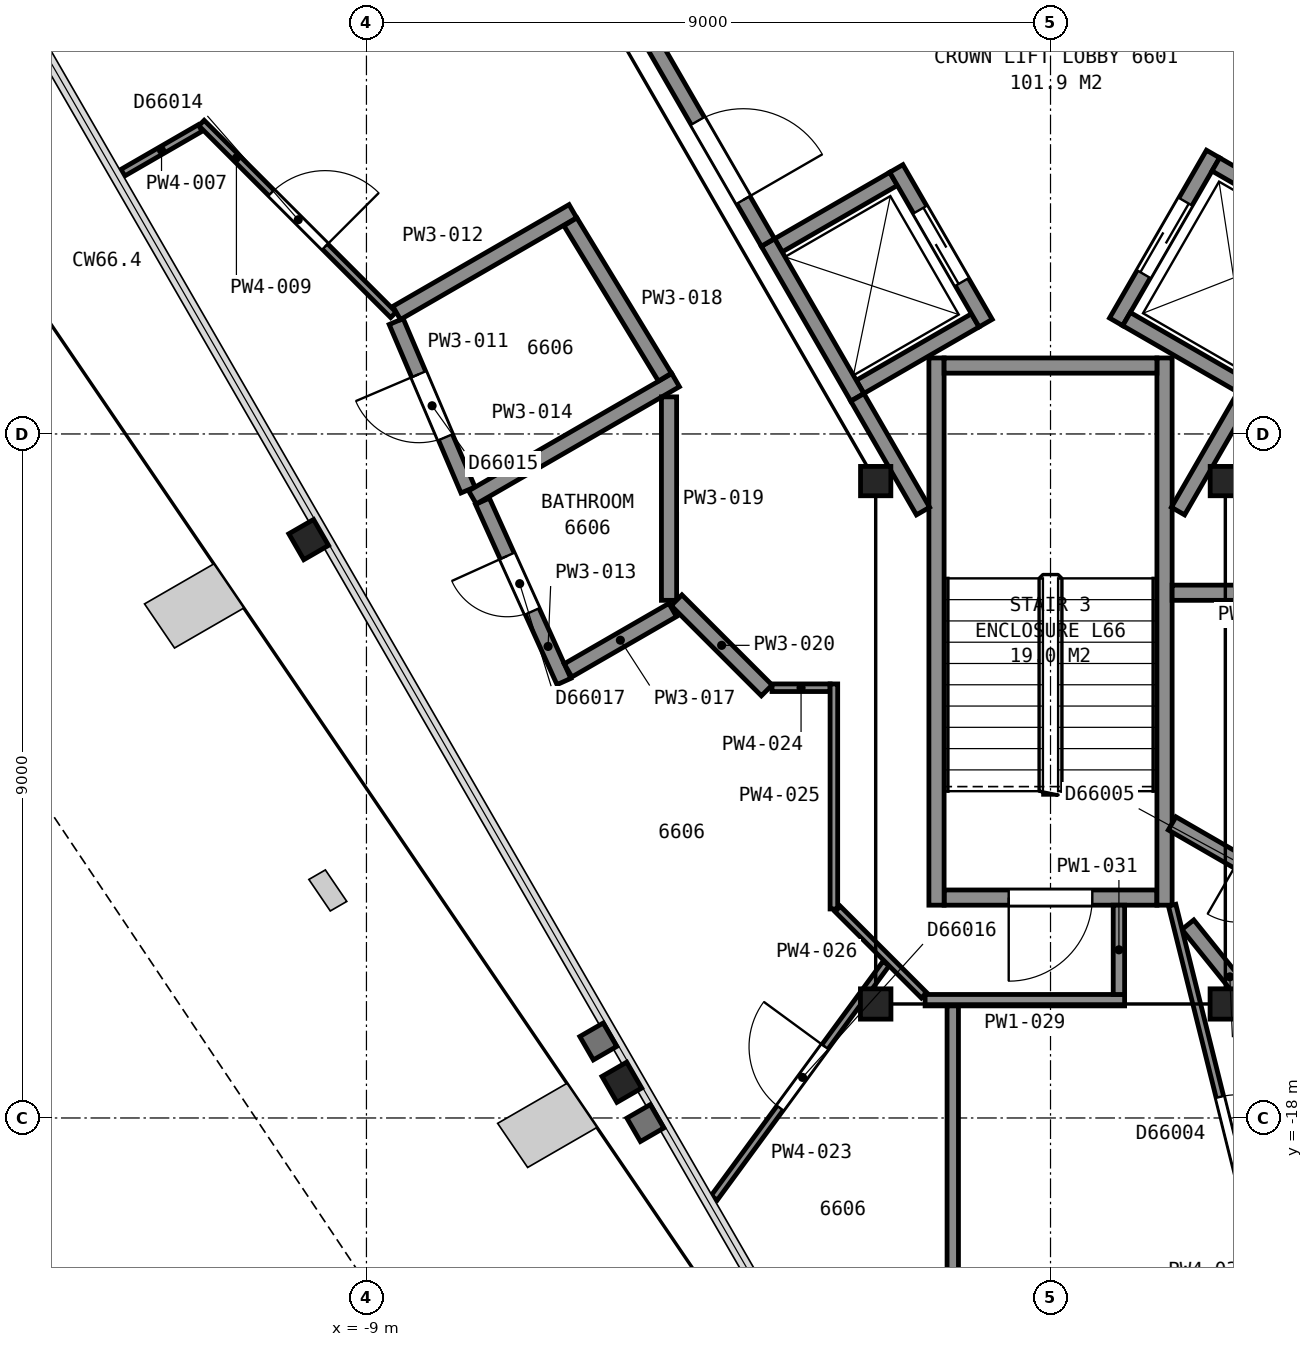
"""IFC4 building model, lengths in metres.
Left out: names, types, materials, properties, quantities, classifications, styles, units other than length and angle.
Written with IfcOpenShell. Run it as: python <this file> out.ifc"""

import sys

from ifc_helpers import new_model, si_unit, direction, frame, frame_2d, origin, origin_2d, place, context, subcontext, project, spatial, rectangle, i_section, extrude, element, fill, save


model = new_model("IFC4")
c1 = context("Model", 3, precision=1e-05, world=origin(), true_north=direction((0.0, 1.0)))
c2 = subcontext(c1, "Body", "Model", "MODEL_VIEW")
j1 = project(units=[si_unit("LENGTHUNIT", "METRE"), si_unit("PLANEANGLEUNIT", "RADIAN")], contexts=[c1])
p1 = place(None, origin())
s1 = spatial("IfcSite", under=j1, at=p1, CompositionType="ELEMENT")
p2 = place(p1, origin())
s2 = spatial("IfcBuilding", under=s1, at=p2, CompositionType="ELEMENT")
p3 = place(p2, frame((0.0, 0.0, 264.0)))
s3 = spatial("IfcBuildingStorey", under=s2, at=p3, CompositionType="ELEMENT", Elevation=264.0)
for number, where, z_axis, x_axis in (
    (1, (-9.76, -10.39, 0.0), (0.0, 0.0, 1.0), (-0.5, 0.866, 0.0)),
    (2, (-5.64, -17.53, 0.0), (0.0, 0.0, 1.0), (-0.5, 0.866, 0.0)),
):
    element("IfcColumn", number, at=place(p3, frame(where, z_axis=z_axis, x_axis=x_axis)), inside=s3, PredefinedType="COLUMN", context=c2, shape_type="SweptSolid", body=[
        extrude(i_section(OverallWidth=0.394, OverallDepth=0.376, WebThickness=0.017, FlangeThickness=0.028, FilletRadius=0.015, at=origin_2d()), origin(), (0.0, 0.0, 1.0), 3.7),
    ])
p4 = place(p3, frame((-2.3, -9.62, 0.05), z_axis=(0.0, 0.0, 1.0), x_axis=(1.0, 0.0, 0.0)))
e3 = element("IfcColumn", 3, at=p4, inside=s3, PredefinedType="COLUMN", context=c2, shape_type="SweptSolid", body=[
    extrude(i_section(OverallWidth=0.399, OverallDepth=0.386, WebThickness=0.021, FlangeThickness=0.033, FilletRadius=0.015, at=origin_2d()), origin(), (0.0, 0.0, 1.0), 3.65),
])
for number, where, z_axis, x_axis in (
    (4, (-2.3, -16.5, 0.05), (0.0, 0.0, 1.0), (-1.0, 0.0, 0.0)),
    (5, (2.3, -16.5, 0.05), (0.0, 0.0, 1.0), (-1.0, 0.0, 0.0)),
):
    element("IfcColumn", number, at=place(p3, frame(where, z_axis=z_axis, x_axis=x_axis)), inside=s3, PredefinedType="COLUMN", context=c2, shape_type="SweptSolid", body=[
        extrude(i_section(OverallWidth=0.401, OverallDepth=0.399, WebThickness=0.025, FlangeThickness=0.04, FilletRadius=0.015, at=origin_2d()), origin(), (0.0, 0.0, 1.0), 3.65),
    ])
p5 = place(p3, frame((2.3, -9.62, 0.05), z_axis=(0.0, 0.0, 1.0), x_axis=(1.0, 0.0, 0.0)))
e6 = element("IfcColumn", 6, at=p5, inside=s3, PredefinedType="COLUMN", context=c2, shape_type="SweptSolid", body=[
    extrude(i_section(OverallWidth=0.399, OverallDepth=0.386, WebThickness=0.021, FlangeThickness=0.033, FilletRadius=0.015, at=origin_2d()), origin(), (0.0, 0.0, 1.0), 3.65),
])
p6 = place(p3, frame((-1.4, -15.1, 0.0), z_axis=(0.0, 0.0, 1.0), x_axis=(1.0, 0.0, 0.0)))
e7 = element("IfcWall", 7, at=p6, inside=s3, PredefinedType="PARTITIONING", context=c2, shape_type="SweptSolid", body=[
    extrude(rectangle(XDim=2.8, YDim=0.2, at=frame_2d((1.4, 0.0))), origin(), (0.0, 0.0, 1.0), 3.45),
])
p7 = place(p6, frame((0.85, 0.0, 0.0)))
e8 = element("IfcOpeningElement", 8, at=p7, cuts=e7, PredefinedType="OPENING", context=c2, shape_type="SweptSolid", body=[
    extrude(rectangle(XDim=1.1, YDim=2.1, at=frame_2d((0.55, 1.05))), frame((0.0, 0.11, 0.0), z_axis=(0.0, -1.0, 0.0), x_axis=(1.0, 0.0, 0.0)), (0.0, 0.0, 1.0), 0.22),
])
for number, where, z_axis, x_axis in (
    (9, (1.5, -8.0, 0.0), (0.0, 0.0, 1.0), (0.0, -1.0, 0.0)),
    (10, (-1.5, -8.0, 0.0), (0.0, 0.0, 1.0), (0.0, -1.0, 0.0)),
):
    element("IfcWall", number, at=place(p3, frame(where, z_axis=z_axis, x_axis=x_axis)), inside=s3, PredefinedType="PARTITIONING", context=c2, shape_type="SweptSolid", body=[
        extrude(rectangle(XDim=7.2, YDim=0.2, at=frame_2d((3.6, 0.0))), origin(), (0.0, 0.0, 1.0), 3.45),
    ])
p8 = place(p3, frame((-1.4, -8.1, 0.0), z_axis=(0.0, 0.0, 1.0), x_axis=(1.0, 0.0, 0.0)))
e11 = element("IfcWall", 11, at=p8, inside=s3, PredefinedType="PARTITIONING", context=c2, shape_type="SweptSolid", body=[
    extrude(rectangle(XDim=2.8, YDim=0.2, at=frame_2d((1.4, 0.0))), origin(), (0.0, 0.0, 1.0), 3.45),
])
for number, where, z_axis, x_axis in (
    (12, (-2.505, -8.38, 0.0), (0.0, 0.0, 1.0), (0.866, 0.5, 0.0)),
    (13, (-3.58, -6.519, 0.0), (0.0, 0.0, 1.0), (0.866, 0.5, 0.0)),
):
    element("IfcWall", number, at=place(p3, frame(where, z_axis=z_axis, x_axis=x_axis)), inside=s3, PredefinedType="PARTITIONING", context=c2, shape_type="SweptSolid", body=[
        extrude(rectangle(XDim=1.75, YDim=0.2, at=frame_2d((0.875, 0.0))), origin(), (0.0, 0.0, 1.0), 3.7),
    ])
p9 = place(p3, frame((0.863, -7.525, 0.0), z_axis=(0.0, 0.0, 1.0), x_axis=(0.499990435942, 0.866030925526, 0.0)))
e14 = element("IfcWall", 14, at=p9, inside=s3, PredefinedType="PARTITIONING", context=c2, shape_type="SweptSolid", body=[
    extrude(rectangle(XDim=2.55, YDim=0.2, at=frame_2d((1.275, 0.0))), origin(), (0.0, 0.0, 1.0), 3.7),
])
p10 = place(p9, frame((0.725, 0.0, 0.0)))
e15 = element("IfcOpeningElement", 15, at=p10, cuts=e14, PredefinedType="OPENING", context=c2, shape_type="SweptSolid", body=[
    extrude(rectangle(XDim=1.1, YDim=2.1, at=frame_2d((0.55, 1.05))), frame((0.0, 0.11, 0.0), z_axis=(0.0, -1.0, 0.0), x_axis=(1.0, 0.0, 0.0)), (0.0, 0.0, 1.0), 0.22),
])
p11 = place(p3, frame((-0.853, -7.542, 0.0), z_axis=(0.0, 0.0, 1.0), x_axis=(-0.500016218704, 0.866016039709, 0.0)))
e16 = element("IfcWall", 16, at=p11, inside=s3, PredefinedType="PARTITIONING", context=c2, shape_type="SweptSolid", body=[
    extrude(rectangle(XDim=2.35, YDim=0.2, at=frame_2d((1.175, 0.0))), origin(), (0.0, 0.0, 1.0), 3.7),
])
p12 = place(p11, frame((0.625, 0.0, 0.0)))
e17 = element("IfcOpeningElement", 17, at=p12, cuts=e16, PredefinedType="OPENING", context=c2, shape_type="SweptSolid", body=[
    extrude(rectangle(XDim=1.1, YDim=2.1, at=frame_2d((0.55, 1.05))), frame((0.0, 0.11, 0.0), z_axis=(0.0, -1.0, 0.0), x_axis=(1.0, 0.0, 0.0)), (0.0, 0.0, 1.0), 0.22),
])
p13 = place(p3, frame((-2.542, -8.517, 0.0), z_axis=(0.0, 0.0, 1.0), x_axis=(-0.500016218704, 0.866016039709, 0.0)))
e18 = element("IfcWall", 18, at=p13, inside=s3, PredefinedType="PARTITIONING", context=c2, shape_type="SweptSolid", body=[
    extrude(rectangle(XDim=2.35, YDim=0.2, at=frame_2d((1.175, 0.0))), origin(), (0.0, 0.0, 1.0), 3.7),
])
for number, where, z_axis, x_axis in (
    (19, (3.69, -6.328, 0.0), (0.0, 0.0, 1.0), (-0.866, 0.5, 0.0)),
    (20, (2.515, -8.363, 0.0), (0.0, 0.0, 1.0), (-0.866, 0.5, 0.0)),
):
    element("IfcWall", number, at=place(p3, frame(where, z_axis=z_axis, x_axis=x_axis)), inside=s3, PredefinedType="PARTITIONING", context=c2, shape_type="SweptSolid", body=[
        extrude(rectangle(XDim=1.75, YDim=0.2, at=frame_2d((0.875, 0.0))), origin(), (0.0, 0.0, 1.0), 3.7),
    ])
p14 = place(p3, frame((-7.141, -0.551, 0.0), z_axis=(0.0, 0.0, 1.0), x_axis=(0.500001302854, -0.86602465158, 0.0)))
e21 = element("IfcWall", 21, at=p14, inside=s3, PredefinedType="PARTITIONING", context=c2, shape_type="SweptSolid", body=[
    extrude(rectangle(XDim=6.846, YDim=0.2, at=frame_2d((3.423, 0.0))), origin(), (0.0, 0.0, 1.0), 3.45),
])
p15 = place(p14, frame((5.0, 0.0, 0.0)))
e22 = element("IfcOpeningElement", 22, at=p15, cuts=e21, PredefinedType="OPENING", context=c2, shape_type="SweptSolid", body=[
    extrude(rectangle(XDim=1.2, YDim=2.1, at=frame_2d((0.6, 1.05))), frame((0.0, 0.11, 0.0), z_axis=(0.0, -1.0, 0.0), x_axis=(1.0, 0.0, 0.0)), (0.0, 0.0, 1.0), 0.22),
])
p16 = place(p3, frame((-2.541, -8.519, 0.0), z_axis=(0.0, 0.0, 1.0), x_axis=(0.500016142392, -0.86601608377, 0.0)))
e23 = element("IfcWall", 23, at=p16, inside=s3, PredefinedType="PARTITIONING", context=c2, shape_type="SweptSolid", body=[
    extrude(rectangle(XDim=1.727, YDim=0.2, at=frame_2d((0.864, 0.0))), origin(), (0.0, 0.0, 1.0), 3.45),
])
p17 = place(p3, frame((1.677, -10.015, 0.0), z_axis=(0.0, 0.0, 1.0), x_axis=(0.49983532306, 0.866120459187, 0.0)))
e24 = element("IfcWall", 24, at=p17, inside=s3, PredefinedType="PARTITIONING", context=c2, shape_type="SweptSolid", body=[
    extrude(rectangle(XDim=1.748, YDim=0.2, at=frame_2d((0.874, 0.0))), origin(), (0.0, 0.0, 1.0), 3.45),
])
p18 = place(p3, frame((-12.205, -5.562, 0.0), z_axis=(0.0, 0.0, 1.0), x_axis=(0.865895054285, 0.500225704022, 0.0)))
e25 = element("IfcWall", 25, at=p18, inside=s3, PredefinedType="PARTITIONING", context=c2, shape_type="SweptSolid", body=[
    extrude(rectangle(XDim=1.176, YDim=0.1, at=frame_2d((0.588, 0.0))), origin(), (0.0, 0.0, 1.0), 2.723),
])
p19 = place(p3, frame((-8.646, -7.433, 0.0), z_axis=(0.0, 0.0, 1.0), x_axis=(-0.707106781187, 0.707106781187, 0.0)))
e26 = element("IfcWall", 26, at=p19, inside=s3, PredefinedType="PARTITIONING", context=c2, shape_type="SweptSolid", body=[
    extrude(rectangle(XDim=3.57, YDim=0.1, at=frame_2d((1.785, 0.0))), origin(), (0.0, 0.0, 1.0), 2.723),
])
p20 = place(p19, frame((1.27, 0.0, 0.0)))
e27 = element("IfcOpeningElement", 27, at=p20, cuts=e26, PredefinedType="OPENING", context=c2, shape_type="SweptSolid", body=[
    extrude(rectangle(XDim=1.0, YDim=2.1, at=frame_2d((0.5, 1.05))), frame((0.0, 0.06, 0.0), z_axis=(0.0, -1.0, 0.0), x_axis=(1.0, 0.0, 0.0)), (0.0, 0.0, 1.0), 0.12),
])
p21 = place(p3, frame((-8.609, -7.521, 0.0), z_axis=(0.0, 0.0, 1.0), x_axis=(0.391998641344, -0.91996579566, 0.0)))
e28 = element("IfcWall", 28, at=p21, inside=s3, PredefinedType="PARTITIONING", context=c2, shape_type="SweptSolid", body=[
    extrude(rectangle(XDim=2.41, YDim=0.2, at=frame_2d((1.205, 0.0))), origin(), (0.0, 0.0, 1.0), 2.723),
])
p22 = place(p21, frame((0.755, 0.0, 0.0)))
e29 = element("IfcOpeningElement", 29, at=p22, cuts=e28, PredefinedType="OPENING", context=c2, shape_type="SweptSolid", body=[
    extrude(rectangle(XDim=0.9, YDim=2.1, at=frame_2d((0.45, 1.05))), frame((0.0, 0.11, 0.0), z_axis=(0.0, -1.0, 0.0), x_axis=(1.0, 0.0, 0.0)), (0.0, 0.0, 1.0), 0.22),
])
p23 = place(p3, frame((-8.603, -7.408, 0.0), z_axis=(0.0, 0.0, 1.0), x_axis=(0.865966883336, 0.500101346695, 0.0)))
e30 = element("IfcWall", 30, at=p23, inside=s3, PredefinedType="PARTITIONING", context=c2, shape_type="SweptSolid", body=[
    extrude(rectangle(XDim=2.677, YDim=0.2, at=frame_2d((1.339, 0.0))), origin(), (0.0, 0.0, 1.0), 2.723),
])
p24 = place(p3, frame((-7.474, -9.885, 0.0), z_axis=(0.0, 0.0, 1.0), x_axis=(0.411787773138, -0.911279775862, 0.0)))
e31 = element("IfcWall", 31, at=p24, inside=s3, PredefinedType="PARTITIONING", context=c2, shape_type="SweptSolid", body=[
    extrude(rectangle(XDim=2.603, YDim=0.2, at=frame_2d((1.301, 0.0))), origin(), (0.0, 0.0, 1.0), 2.723),
])
p25 = place(p24, frame((0.79, 0.0, 0.0)))
e32 = element("IfcOpeningElement", 32, at=p25, cuts=e31, PredefinedType="OPENING", context=c2, shape_type="SweptSolid", body=[
    extrude(rectangle(XDim=0.8, YDim=2.1, at=frame_2d((0.4, 1.05))), frame((0.0, 0.11, 0.0), z_axis=(0.0, -1.0, 0.0), x_axis=(1.0, 0.0, 0.0)), (0.0, 0.0, 1.0), 0.22),
])
p26 = place(p3, frame((-7.606, -9.835, 0.0), z_axis=(0.0, 0.0, 1.0), x_axis=(0.866093395895, 0.499882215713, 0.0)))
e33 = element("IfcWall", 33, at=p26, inside=s3, PredefinedType="PARTITIONING", context=c2, shape_type="SweptSolid", body=[
    extrude(rectangle(XDim=3.087, YDim=0.2, at=frame_2d((1.543, 0.0))), origin(), (0.0, 0.0, 1.0), 2.723),
])
p27 = place(p3, frame((-6.348, -12.111, 0.0), z_axis=(0.0, 0.0, 1.0), x_axis=(0.866004001318, 0.500037068326, 0.0)))
e34 = element("IfcWall", 34, at=p27, inside=s3, PredefinedType="PARTITIONING", context=c2, shape_type="SweptSolid", body=[
    extrude(rectangle(XDim=1.59, YDim=0.2, at=frame_2d((0.795, 0.0))), origin(), (0.0, 0.0, 1.0), 2.723),
])
p28 = place(p3, frame((-6.316, -6.209, 0.0), z_axis=(0.0, 0.0, 1.0), x_axis=(0.519665190876, -0.854369995606, 0.0)))
e35 = element("IfcWall", 35, at=p28, inside=s3, PredefinedType="PARTITIONING", context=c2, shape_type="SweptSolid", body=[
    extrude(rectangle(XDim=2.392, YDim=0.2, at=frame_2d((1.196, 0.0))), origin(), (0.0, 0.0, 1.0), 2.723),
])
p29 = place(p3, frame((-5.019, -11.189, 0.0), z_axis=(0.0, 0.0, 1.0), x_axis=(0.0, 1.0, 0.0)))
e36 = element("IfcWall", 36, at=p29, inside=s3, PredefinedType="PARTITIONING", context=c2, shape_type="SweptSolid", body=[
    extrude(rectangle(XDim=2.677, YDim=0.2, at=frame_2d((1.338, 0.0))), origin(), (0.0, 0.0, 1.0), 2.723),
])
p30 = place(p3, frame((-4.92, -11.188, 0.0), z_axis=(0.0, 0.0, 1.0), x_axis=(0.707106781187, -0.707106781187, 0.0)))
e37 = element("IfcWall", 37, at=p30, inside=s3, PredefinedType="PARTITIONING", context=c2, shape_type="SweptSolid", body=[
    extrude(rectangle(XDim=1.678, YDim=0.2, at=frame_2d((0.839, 0.0))), origin(), (0.0, 0.0, 1.0), 2.723),
])
p31 = place(p3, frame((-2.164, -15.968, 0.0), z_axis=(0.0, 0.0, 1.0), x_axis=(-0.591435630084, -0.806352215516, 0.0)))
e38 = element("IfcWall", 38, at=p31, inside=s3, PredefinedType="PARTITIONING", context=c2, shape_type="SweptSolid", body=[
    extrude(rectangle(XDim=3.824, YDim=0.1, at=frame_2d((1.912, 0.0))), origin(), (0.0, 0.0, 1.0), 2.723),
])
p32 = place(p31, frame((1.358, 0.0, 0.0)))
e39 = element("IfcOpeningElement", 39, at=p32, cuts=e38, PredefinedType="OPENING", context=c2, shape_type="SweptSolid", body=[
    extrude(rectangle(XDim=1.0, YDim=2.1, at=frame_2d((0.5, 1.05))), frame((0.0, 0.06, 0.0), z_axis=(0.0, -1.0, 0.0), x_axis=(1.0, 0.0, 0.0)), (0.0, 0.0, 1.0), 0.12),
])
p33 = place(p3, frame((-3.664, -12.339, 0.0), z_axis=(0.0, 0.0, 1.0), x_axis=(1.0, 0.0, 0.0)))
e40 = element("IfcWall", 40, at=p33, inside=s3, PredefinedType="PARTITIONING", context=c2, shape_type="SweptSolid", body=[
    extrude(rectangle(XDim=0.764, YDim=0.1, at=frame_2d((0.382, 0.0))), origin(), (0.0, 0.0, 1.0), 2.723),
])
p34 = place(p3, frame((-2.85, -15.25, 0.0), z_axis=(0.0, 0.0, 1.0), x_axis=(0.0, 1.0, 0.0)))
e41 = element("IfcWall", 41, at=p34, inside=s3, PredefinedType="PARTITIONING", context=c2, shape_type="SweptSolid", body=[
    extrude(rectangle(XDim=2.961, YDim=0.1, at=frame_2d((1.48, 0.0))), origin(), (0.0, 0.0, 1.0), 2.723),
])
p35 = place(p3, frame((-2.801, -15.25, 0.0), z_axis=(0.0, 0.0, 1.0), x_axis=(0.707106781187, -0.707106781187, 0.0)))
e42 = element("IfcWall", 42, at=p35, inside=s3, PredefinedType="PARTITIONING", context=c2, shape_type="SweptSolid", body=[
    extrude(rectangle(XDim=1.608, YDim=0.1, at=frame_2d((0.804, 0.0))), origin(), (0.0, 0.0, 1.0), 2.723),
])
p36 = place(p3, frame((-1.65, -16.45, 0.0), z_axis=(0.0, 0.0, 1.0), x_axis=(1.0, 0.0, 0.0)))
e43 = element("IfcWall", 43, at=p36, inside=s3, PredefinedType="PARTITIONING", context=c2, shape_type="SweptSolid", body=[
    extrude(rectangle(XDim=2.625, YDim=0.15, at=frame_2d((1.312, 0.0))), origin(), (0.0, 0.0, 1.0), 2.723),
])
p37 = place(p3, frame((-1.286, -24.421, 0.0), z_axis=(0.0, 0.0, 1.0), x_axis=(0.0, 1.0, 0.0)))
e44 = element("IfcWall", 44, at=p37, inside=s3, PredefinedType="PARTITIONING", context=c2, shape_type="SweptSolid", body=[
    extrude(rectangle(XDim=7.896, YDim=0.15, at=frame_2d((3.948, 0.0))), origin(), (0.0, 0.0, 1.0), 2.723),
])
p38 = place(p3, frame((0.9, -16.375, 0.0), z_axis=(0.0, 0.0, 1.0), x_axis=(0.0, 1.0, 0.0)))
e45 = element("IfcWall", 45, at=p38, inside=s3, PredefinedType="PARTITIONING", context=c2, shape_type="SweptSolid", body=[
    extrude(rectangle(XDim=1.175, YDim=0.15, at=frame_2d((0.587, 0.0))), origin(), (0.0, 0.0, 1.0), 2.723),
])
p39 = place(p3, frame((1.807, -15.457, 0.0), z_axis=(0.0, 0.0, 1.0), x_axis=(0.62721044395, -0.778849830841, 0.0)))
e46 = element("IfcWall", 46, at=p39, inside=s3, PredefinedType="PARTITIONING", context=c2, shape_type="SweptSolid", body=[
    extrude(rectangle(XDim=1.761, YDim=0.2, at=frame_2d((0.881, 0.0))), origin(), (0.0, 0.0, 1.0), 2.723),
])
p40 = place(p3, frame((3.127, -21.335, 0.0), z_axis=(0.0, 0.0, 1.0), x_axis=(-0.241554155251, 0.970387340231, 0.0)))
e47 = element("IfcWall", 47, at=p40, inside=s3, PredefinedType="PARTITIONING", context=c2, shape_type="SweptSolid", body=[
    extrude(rectangle(XDim=6.322, YDim=0.1, at=frame_2d((3.161, 0.0))), origin(), (0.0, 0.0, 1.0), 2.723),
])
p41 = place(p40, frame((2.722, 0.0, 0.0)))
e48 = element("IfcOpeningElement", 48, at=p41, cuts=e47, PredefinedType="OPENING", context=c2, shape_type="SweptSolid", body=[
    extrude(rectangle(XDim=1.0, YDim=2.1, at=frame_2d((0.5, 1.05))), frame((0.0, 0.06, 0.0), z_axis=(0.0, -1.0, 0.0), x_axis=(1.0, 0.0, 0.0)), (0.0, 0.0, 1.0), 0.12),
])
p42 = place(p3, frame((4.144, -15.593, 0.0), z_axis=(0.0, 0.0, 1.0), x_axis=(-0.865947474014, 0.500134954036, 0.0)))
e49 = element("IfcWall", 49, at=p42, inside=s3, PredefinedType="PARTITIONING", context=c2, shape_type="SweptSolid", body=[
    extrude(rectangle(XDim=2.937, YDim=0.2, at=frame_2d((1.469, 0.0))), origin(), (0.0, 0.0, 1.0), 2.723),
])
p43 = place(p42, frame((1.137, 0.0, 0.0)))
e50 = element("IfcOpeningElement", 50, at=p43, cuts=e49, PredefinedType="OPENING", context=c2, shape_type="SweptSolid", body=[
    extrude(rectangle(XDim=0.8, YDim=2.1, at=frame_2d((0.4, 1.05))), frame((0.0, 0.11, 0.0), z_axis=(0.0, -1.0, 0.0), x_axis=(1.0, 0.0, 0.0)), (0.0, 0.0, 1.0), 0.22),
])
p44 = place(p3, frame((1.6, -11.089, 0.0), z_axis=(0.0, 0.0, 1.0), x_axis=(1.0, 0.0, 0.0)))
e51 = element("IfcWall", 51, at=p44, inside=s3, PredefinedType="PARTITIONING", context=c2, shape_type="SweptSolid", body=[
    extrude(rectangle(XDim=2.269, YDim=0.2, at=frame_2d((1.134, 0.0))), origin(), (0.0, 0.0, 1.0), 2.723),
])
p45 = place(p7, origin())
e52 = element("IfcDoor", 52, at=p45, inside=s3, OperationType="SINGLE_SWING_LEFT", PredefinedType="DOOR", context=c2, shape_type="SweptSolid", body=[
    extrude(rectangle(XDim=1.1, YDim=2.1, at=frame_2d((0.55, 1.05))), frame((0.0, 0.025, 0.0), z_axis=(0.0, -1.0, 0.0), x_axis=(1.0, 0.0, 0.0)), (0.0, 0.0, 1.0), 0.05),
])
fill(e8, e52)
p46 = place(p12, origin())
e53 = element("IfcDoor", 53, at=p46, inside=s3, OperationType="SLIDING_TO_LEFT", PredefinedType="DOOR", context=c2, shape_type="SweptSolid", body=[
    extrude(rectangle(XDim=1.1, YDim=2.1, at=frame_2d((0.55, 1.05))), frame((0.0, 0.025, 0.0), z_axis=(0.0, -1.0, 0.0), x_axis=(1.0, 0.0, 0.0)), (0.0, 0.0, 1.0), 0.05),
])
fill(e17, e53)
p47 = place(p10, origin())
e54 = element("IfcDoor", 54, at=p47, inside=s3, OperationType="SLIDING_TO_LEFT", PredefinedType="DOOR", context=c2, shape_type="SweptSolid", body=[
    extrude(rectangle(XDim=1.1, YDim=2.1, at=frame_2d((0.55, 1.05))), frame((0.0, 0.025, 0.0), z_axis=(0.0, -1.0, 0.0), x_axis=(1.0, 0.0, 0.0)), (0.0, 0.0, 1.0), 0.05),
])
fill(e15, e54)
p48 = place(p15, origin())
e55 = element("IfcDoor", 55, at=p48, inside=s3, OperationType="SINGLE_SWING_RIGHT", PredefinedType="DOOR", context=c2, shape_type="SweptSolid", body=[
    extrude(rectangle(XDim=1.2, YDim=2.1, at=frame_2d((0.6, 1.05))), frame((0.0, 0.025, 0.0), z_axis=(0.0, -1.0, 0.0), x_axis=(1.0, 0.0, 0.0)), (0.0, 0.0, 1.0), 0.05),
])
fill(e22, e55)
p49 = place(p20, origin())
e56 = element("IfcDoor", 56, at=p49, inside=s3, OperationType="SINGLE_SWING_LEFT", PredefinedType="DOOR", context=c2, shape_type="SweptSolid", body=[
    extrude(rectangle(XDim=1.0, YDim=2.1, at=frame_2d((0.5, 1.05))), frame((0.0, 0.025, 0.0), z_axis=(0.0, -1.0, 0.0), x_axis=(1.0, 0.0, 0.0)), (0.0, 0.0, 1.0), 0.05),
])
fill(e27, e56)
p50 = place(p22, origin())
e57 = element("IfcDoor", 57, at=p50, inside=s3, OperationType="SINGLE_SWING_LEFT", PredefinedType="DOOR", context=c2, shape_type="SweptSolid", body=[
    extrude(rectangle(XDim=0.9, YDim=2.1, at=frame_2d((0.45, 1.05))), frame((0.0, 0.025, 0.0), z_axis=(0.0, -1.0, 0.0), x_axis=(1.0, 0.0, 0.0)), (0.0, 0.0, 1.0), 0.05),
])
fill(e29, e57)
p51 = place(p25, origin())
e58 = element("IfcDoor", 58, at=p51, inside=s3, OperationType="SINGLE_SWING_LEFT", PredefinedType="DOOR", context=c2, shape_type="SweptSolid", body=[
    extrude(rectangle(XDim=0.8, YDim=2.1, at=frame_2d((0.4, 1.05))), frame((0.0, 0.025, 0.0), z_axis=(0.0, -1.0, 0.0), x_axis=(1.0, 0.0, 0.0)), (0.0, 0.0, 1.0), 0.05),
])
fill(e32, e58)
p52 = place(p32, origin())
e59 = element("IfcDoor", 59, at=p52, inside=s3, OperationType="SINGLE_SWING_LEFT", PredefinedType="DOOR", context=c2, shape_type="SweptSolid", body=[
    extrude(rectangle(XDim=1.0, YDim=2.1, at=frame_2d((0.5, 1.05))), frame((0.0, 0.025, 0.0), z_axis=(0.0, -1.0, 0.0), x_axis=(1.0, 0.0, 0.0)), (0.0, 0.0, 1.0), 0.05),
])
fill(e39, e59)
p53 = place(p41, origin())
e60 = element("IfcDoor", 60, at=p53, inside=s3, OperationType="SINGLE_SWING_LEFT", PredefinedType="DOOR", context=c2, shape_type="SweptSolid", body=[
    extrude(rectangle(XDim=1.0, YDim=2.1, at=frame_2d((0.5, 1.05))), frame((0.0, 0.025, 0.0), z_axis=(0.0, -1.0, 0.0), x_axis=(1.0, 0.0, 0.0)), (0.0, 0.0, 1.0), 0.05),
])
fill(e48, e60)
save(model, sys.argv[1])
